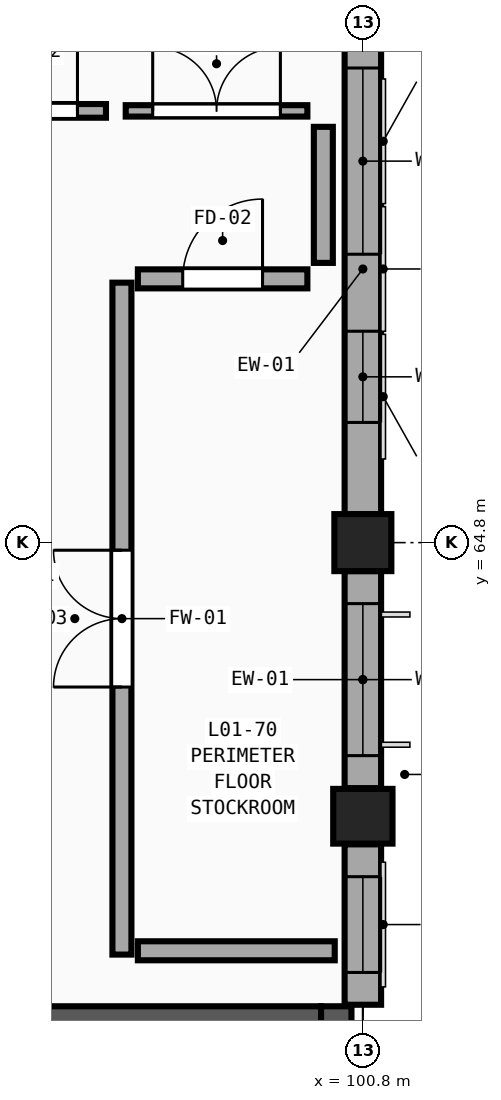
"""IFC4 building model, lengths in metres.
Left out: names, types, materials, properties, quantities, classifications, styles, units other than length and angle.
Written with IfcOpenShell. Run it as: python <this file> out.ifc"""

import sys

from ifc_helpers import new_model, si_unit, direction, frame, frame_2d, origin, origin_2d, place, context, subcontext, project, spatial, rectangle, extrude, element, fill, save


model = new_model("IFC4")
c1 = context("Model", 3, precision=1e-05, world=origin(), true_north=direction((0.0, 1.0)))
c2 = subcontext(c1, "Body", "Model", "MODEL_VIEW")
j1 = project(units=[si_unit("LENGTHUNIT", "METRE"), si_unit("PLANEANGLEUNIT", "RADIAN")], contexts=[c1])
p1 = place(None, origin())
s1 = spatial("IfcSite", under=j1, at=p1, CompositionType="ELEMENT")
p2 = place(p1, origin())
s2 = spatial("IfcBuilding", under=s1, at=p2, CompositionType="ELEMENT")
p3 = place(p2, frame((0.0, 0.0, 5.4)))
s3 = spatial("IfcBuildingStorey", under=s2, at=p3, CompositionType="ELEMENT", Elevation=5.4)
p4 = place(p3, frame((100.8, 64.8, 0.0), z_axis=(0.0, 0.0, 1.0), x_axis=(1.0, 0.0, 0.0)))
e1 = element("IfcColumn", 1, at=p4, inside=s3, PredefinedType="COLUMN", context=c2, shape_type="SweptSolid", body=[
    extrude(rectangle(XDim=0.75, YDim=0.75, at=origin_2d()), origin(), (0.0, 0.0, 1.0), 4.5),
])
p5 = place(p3, frame((100.8, 61.2, 0.0), z_axis=(0.0, 0.0, 1.0), x_axis=(1.0, 0.0, 0.0)))
e2 = element("IfcColumn", 2, at=p5, inside=s3, PredefinedType="PILASTER", context=c2, shape_type="SweptSolid", body=[
    extrude(rectangle(XDim=0.78, YDim=0.72, at=origin_2d()), origin(), (0.0, 0.0, 1.0), 4.5),
])
p6 = place(p3, frame((100.8, 64.425, 0.0), z_axis=(0.0, 0.0, 1.0), x_axis=(0.0, -1.0, 0.0)))
e3 = element("IfcWall", 3, at=p6, inside=s3, PredefinedType="SOLIDWALL", context=c2, shape_type="SweptSolid", body=[
    extrude(rectangle(XDim=2.855, YDim=0.48, at=frame_2d((1.427, 0.0))), origin(), (0.0, 0.0, 1.0), 3.63),
])
p7 = place(p6, frame((0.427, 0.0, 0.75)))
e4 = element("IfcOpeningElement", 4, at=p7, cuts=e3, PredefinedType="OPENING", context=c2, shape_type="SweptSolid", body=[
    extrude(rectangle(XDim=2.0, YDim=2.73, at=frame_2d((1.0, 1.365))), frame((0.0, 0.26, 0.0), z_axis=(0.0, -1.0, 0.0), x_axis=(1.0, 0.0, 0.0)), (0.0, 0.0, 1.0), 0.52),
])
p8 = place(p3, frame((100.8, 60.83, 0.0), z_axis=(0.0, 0.0, 1.0), x_axis=(0.0, -1.0, 0.0)))
e5 = element("IfcWall", 5, at=p8, inside=s3, PredefinedType="SOLIDWALL", context=c2, shape_type="SweptSolid", body=[
    extrude(rectangle(XDim=2.11, YDim=0.48, at=frame_2d((1.055, 0.0))), origin(), (0.0, 0.0, 1.0), 3.63),
])
p9 = place(p8, frame((0.425, 0.0, 0.75)))
e6 = element("IfcOpeningElement", 6, at=p9, cuts=e5, PredefinedType="OPENING", context=c2, shape_type="SweptSolid", body=[
    extrude(rectangle(XDim=1.26, YDim=2.73, at=frame_2d((0.63, 1.365))), frame((0.0, 0.26, 0.0), z_axis=(0.0, -1.0, 0.0), x_axis=(1.0, 0.0, 0.0)), (0.0, 0.0, 1.0), 0.52),
])
p10 = place(p3, frame((100.8, 71.625, 0.0), z_axis=(0.0, 0.0, 1.0), x_axis=(0.0, -1.0, 0.0)))
e7 = element("IfcWall", 7, at=p10, inside=s3, PredefinedType="SOLIDWALL", context=c2, shape_type="SweptSolid", body=[
    extrude(rectangle(XDim=6.45, YDim=0.48, at=frame_2d((3.225, 0.0))), origin(), (0.0, 0.0, 1.0), 3.63),
])
p11 = place(p10, frame((0.581, 0.0, 0.75)))
e8 = element("IfcOpeningElement", 8, at=p11, cuts=e7, PredefinedType="OPENING", context=c2, shape_type="SweptSolid", body=[
    extrude(rectangle(XDim=2.45, YDim=2.73, at=frame_2d((1.225, 1.365))), frame((0.0, 0.26, 0.0), z_axis=(0.0, -1.0, 0.0), x_axis=(1.0, 0.0, 0.0)), (0.0, 0.0, 1.0), 0.52),
])
p12 = place(p10, frame((4.044, 0.0, 0.75)))
e9 = element("IfcOpeningElement", 9, at=p12, cuts=e7, PredefinedType="OPENING", context=c2, shape_type="SweptSolid", body=[
    extrude(rectangle(XDim=1.2, YDim=2.73, at=frame_2d((0.6, 1.365))), frame((0.0, 0.26, 0.0), z_axis=(0.0, -1.0, 0.0), x_axis=(1.0, 0.0, 0.0)), (0.0, 0.0, 1.0), 0.52),
])
p13 = place(p3, frame((92.95, 58.5, 0.0), z_axis=(0.0, 0.0, 1.0), x_axis=(1.0, 0.0, 0.0)))
e10 = element("IfcWall", 10, at=p13, inside=s3, PredefinedType="SHEAR", context=c2, shape_type="SweptSolid", body=[
    extrude(rectangle(XDim=7.3, YDim=0.4, at=frame_2d((3.65, 0.0))), origin(), (0.0, 0.0, 1.0), 4.5),
])
p14 = place(p3, frame((100.45, 50.45, 0.0), z_axis=(0.0, 0.0, 1.0), x_axis=(0.0, 1.0, 0.0)))
e11 = element("IfcWall", 11, at=p14, inside=s3, PredefinedType="SHEAR", context=c2, shape_type="SweptSolid", body=[
    extrude(rectangle(XDim=8.25, YDim=0.4, at=frame_2d((4.125, 0.0))), origin(), (0.0, 0.0, 1.0), 4.5),
])
p15 = place(p3, frame((97.63, 59.38, 0.0), z_axis=(0.0, 0.0, 1.0), x_axis=(0.0, 1.0, 0.0)))
e12 = element("IfcWall", 12, at=p15, inside=s3, PredefinedType="SOLIDWALL", context=c2, shape_type="SweptSolid", body=[
    extrude(rectangle(XDim=8.84, YDim=0.25, at=frame_2d((4.42, 0.0))), origin(), (0.0, 0.0, 1.0), 4.18),
])
p16 = place(p15, frame((3.52, 0.0, 0.0)))
e13 = element("IfcOpeningElement", 13, at=p16, cuts=e12, PredefinedType="OPENING", context=c2, shape_type="SweptSolid", body=[
    extrude(rectangle(XDim=1.8, YDim=2.3, at=frame_2d((0.9, 1.15))), frame((0.0, 0.145, 0.0), z_axis=(0.0, -1.0, 0.0), x_axis=(1.0, 0.0, 0.0)), (0.0, 0.0, 1.0), 0.29),
])
p17 = place(p3, frame((97.68, 70.48, 0.0), z_axis=(0.0, 0.0, 1.0), x_axis=(1.0, 0.0, 0.0)))
e14 = element("IfcWall", 14, at=p17, inside=s3, PredefinedType="PARTITIONING", context=c2, shape_type="SweptSolid", body=[
    extrude(rectangle(XDim=2.39, YDim=0.15, at=frame_2d((1.195, 0.0))), origin(), (0.0, 0.0, 1.0), 4.18),
])
p18 = place(p17, frame((0.355, 0.0, 0.0)))
e15 = element("IfcOpeningElement", 15, at=p18, cuts=e14, PredefinedType="OPENING", context=c2, shape_type="SweptSolid", body=[
    extrude(rectangle(XDim=1.68, YDim=2.45, at=frame_2d((0.84, 1.225))), frame((0.0, 0.095, 0.0), z_axis=(0.0, -1.0, 0.0), x_axis=(1.0, 0.0, 0.0)), (0.0, 0.0, 1.0), 0.19),
])
p19 = place(p3, frame((97.84, 68.27, 0.0), z_axis=(0.0, 0.0, 1.0), x_axis=(1.0, 0.0, 0.0)))
e16 = element("IfcWall", 16, at=p19, inside=s3, PredefinedType="SOLIDWALL", context=c2, shape_type="SweptSolid", body=[
    extrude(rectangle(XDim=2.23, YDim=0.25, at=frame_2d((1.115, 0.0))), origin(), (0.0, 0.0, 1.0), 4.18),
])
p20 = place(p19, frame((0.59, 0.0, 0.0)))
e17 = element("IfcOpeningElement", 17, at=p20, cuts=e16, PredefinedType="OPENING", context=c2, shape_type="SweptSolid", body=[
    extrude(rectangle(XDim=1.05, YDim=2.15, at=frame_2d((0.525, 1.075))), frame((0.0, 0.145, 0.0), z_axis=(0.0, -1.0, 0.0), x_axis=(1.0, 0.0, 0.0)), (0.0, 0.0, 1.0), 0.29),
])
p21 = place(p3, frame((100.28, 68.48, 0.0), z_axis=(0.0, 0.0, 1.0), x_axis=(0.0, 1.0, 0.0)))
e18 = element("IfcWall", 18, at=p21, inside=s3, PredefinedType="SOLIDWALL", context=c2, shape_type="SweptSolid", body=[
    extrude(rectangle(XDim=1.79, YDim=0.25, at=frame_2d((0.895, 0.0))), origin(), (0.0, 0.0, 1.0), 3.63),
])
p22 = place(p3, frame((95.63, 70.48, 0.0), z_axis=(0.0, 0.0, 1.0), x_axis=(1.0, 0.0, 0.0)))
e19 = element("IfcWall", 19, at=p22, inside=s3, PredefinedType="PARTITIONING", context=c2, shape_type="SweptSolid", body=[
    extrude(rectangle(XDim=1.79, YDim=0.18, at=frame_2d((0.895, 0.0))), origin(), (0.0, 0.0, 1.0), 4.18),
])
p23 = place(p22, frame((0.375, 0.0, 0.0)))
e20 = element("IfcOpeningElement", 20, at=p23, cuts=e19, PredefinedType="OPENING", context=c2, shape_type="SweptSolid", body=[
    extrude(rectangle(XDim=1.04, YDim=2.05, at=frame_2d((0.52, 1.025))), frame((0.0, 0.11, 0.0), z_axis=(0.0, -1.0, 0.0), x_axis=(1.0, 0.0, 0.0)), (0.0, 0.0, 1.0), 0.22),
])
p24 = place(p3, frame((97.84, 59.43, 0.0), z_axis=(0.0, 0.0, 1.0), x_axis=(1.0, 0.0, 0.0)))
e21 = element("IfcWall", 21, at=p24, inside=s3, PredefinedType="SOLIDWALL", context=c2, shape_type="SweptSolid", body=[
    extrude(rectangle(XDim=2.59, YDim=0.25, at=frame_2d((1.295, 0.0))), origin(), (0.0, 0.0, 1.0), 4.18),
])
p25 = place(p7, origin())
e22 = element("IfcWindow", 22, at=p25, inside=s3, PartitioningType="TRIPLE_PANEL_VERTICAL", PredefinedType="WINDOW", context=c2, shape_type="SweptSolid", body=[
    extrude(rectangle(XDim=2.0, YDim=2.73, at=frame_2d((1.0, 1.365))), frame((0.0, 0.03, 0.0), z_axis=(0.0, -1.0, 0.0), x_axis=(1.0, 0.0, 0.0)), (0.0, 0.0, 1.0), 0.06),
])
fill(e4, e22)
p26 = place(p9, origin())
e23 = element("IfcWindow", 23, at=p26, inside=s3, PartitioningType="TRIPLE_PANEL_VERTICAL", PredefinedType="WINDOW", context=c2, shape_type="SweptSolid", body=[
    extrude(rectangle(XDim=1.26, YDim=2.73, at=frame_2d((0.63, 1.365))), frame((0.0, 0.03, 0.0), z_axis=(0.0, -1.0, 0.0), x_axis=(1.0, 0.0, 0.0)), (0.0, 0.0, 1.0), 0.06),
])
fill(e6, e23)
p27 = place(p11, origin())
e24 = element("IfcWindow", 24, at=p27, inside=s3, PartitioningType="TRIPLE_PANEL_VERTICAL", PredefinedType="WINDOW", context=c2, shape_type="SweptSolid", body=[
    extrude(rectangle(XDim=2.45, YDim=2.73, at=frame_2d((1.225, 1.365))), frame((0.0, 0.03, 0.0), z_axis=(0.0, -1.0, 0.0), x_axis=(1.0, 0.0, 0.0)), (0.0, 0.0, 1.0), 0.06),
])
fill(e8, e24)
p28 = place(p12, origin())
e25 = element("IfcWindow", 25, at=p28, inside=s3, PartitioningType="SINGLE_PANEL", PredefinedType="WINDOW", context=c2, shape_type="SweptSolid", body=[
    extrude(rectangle(XDim=1.2, YDim=2.73, at=frame_2d((0.6, 1.365))), frame((0.0, 0.03, 0.0), z_axis=(0.0, -1.0, 0.0), x_axis=(1.0, 0.0, 0.0)), (0.0, 0.0, 1.0), 0.06),
])
fill(e9, e25)
p29 = place(p16, origin())
e26 = element("IfcDoor", 26, at=p29, inside=s3, OperationType="DOUBLE_DOOR_SINGLE_SWING", PredefinedType="DOOR", context=c2, shape_type="SweptSolid", body=[
    extrude(rectangle(XDim=1.8, YDim=2.3, at=frame_2d((0.9, 1.15))), frame((0.0, 0.025, 0.0), z_axis=(0.0, -1.0, 0.0), x_axis=(1.0, 0.0, 0.0)), (0.0, 0.0, 1.0), 0.05),
])
fill(e13, e26)
p30 = place(p18, origin())
e27 = element("IfcDoor", 27, at=p30, inside=s3, OperationType="DOUBLE_DOOR_SINGLE_SWING", PredefinedType="DOOR", context=c2, shape_type="SweptSolid", body=[
    extrude(rectangle(XDim=1.68, YDim=2.45, at=frame_2d((0.84, 1.225))), frame((0.0, 0.025, 0.0), z_axis=(0.0, -1.0, 0.0), x_axis=(1.0, 0.0, 0.0)), (0.0, 0.0, 1.0), 0.05),
])
fill(e15, e27)
p31 = place(p20, origin())
e28 = element("IfcDoor", 28, at=p31, inside=s3, OperationType="SINGLE_SWING_RIGHT", PredefinedType="DOOR", context=c2, shape_type="SweptSolid", body=[
    extrude(rectangle(XDim=1.05, YDim=2.15, at=frame_2d((0.525, 1.075))), frame((0.0, 0.025, 0.0), z_axis=(0.0, -1.0, 0.0), x_axis=(1.0, 0.0, 0.0)), (0.0, 0.0, 1.0), 0.05),
])
fill(e17, e28)
p32 = place(p23, origin())
e29 = element("IfcDoor", 29, at=p32, inside=s3, OperationType="SINGLE_SWING_RIGHT", PredefinedType="DOOR", context=c2, shape_type="SweptSolid", body=[
    extrude(rectangle(XDim=1.04, YDim=2.05, at=frame_2d((0.52, 1.025))), frame((0.0, 0.025, 0.0), z_axis=(0.0, -1.0, 0.0), x_axis=(1.0, 0.0, 0.0)), (0.0, 0.0, 1.0), 0.05),
])
fill(e20, e29)
save(model, sys.argv[1])
